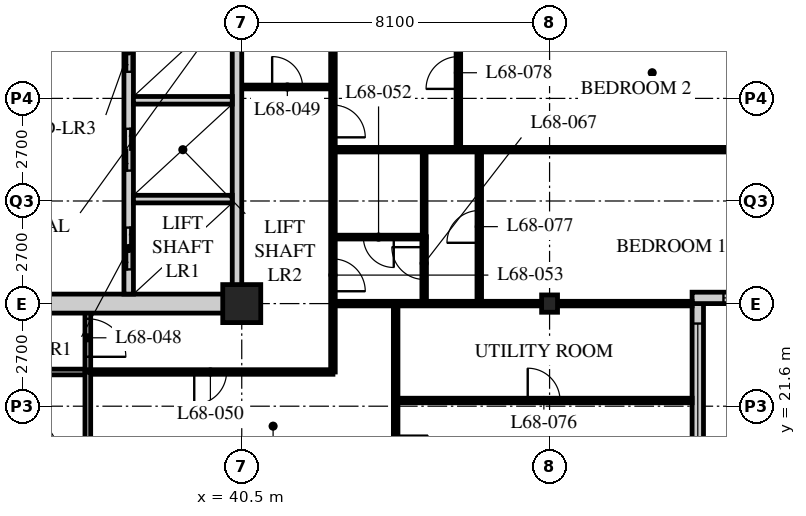
"""IFC4 building model, lengths in metres.
Left out: names, types, materials, properties, quantities, classifications, styles, units other than length and angle.
Written with IfcOpenShell. Run it as: python <this file> out.ifc"""

import sys

from ifc_helpers import new_model, si_unit, direction, frame, frame_2d, origin, origin_2d, place, context, subcontext, project, spatial, rectangle, hollow_rectangle, i_section, extrude, element, fill, save


model = new_model("IFC4")
c1 = context("Model", 3, precision=1e-05, world=origin(), true_north=direction((0.0, 1.0)))
c2 = subcontext(c1, "Body", "Model", "MODEL_VIEW")
j1 = project(units=[si_unit("LENGTHUNIT", "METRE"), si_unit("PLANEANGLEUNIT", "RADIAN")], contexts=[c1])
p1 = place(None, origin())
s1 = spatial("IfcSite", under=j1, at=p1, CompositionType="ELEMENT")
p2 = place(p1, origin())
s2 = spatial("IfcBuilding", under=s1, at=p2, CompositionType="ELEMENT")
p3 = place(p2, frame((0.0, 0.0, 265.8)))
s3 = spatial("IfcBuildingStorey", under=s2, at=p3, CompositionType="ELEMENT", Elevation=265.8)
p4 = place(p3, frame((40.5, 24.3, 0.0), z_axis=(0.0, 0.0, 1.0), x_axis=(1.0, 0.0, 0.0)))
e1 = element("IfcColumn", 1, at=p4, inside=s3, PredefinedType="COLUMN", context=c2, shape_type="SweptSolid", body=[
    extrude(hollow_rectangle(XDim=1.0, YDim=1.0, WallThickness=0.1, at=origin_2d()), origin(), (0.0, 0.0, 1.0), 3.9),
])
p5 = place(p3, frame((48.6, 24.3, 0.0), z_axis=(0.0, 0.0, 1.0), x_axis=(1.0, 0.0, 0.0)))
e2 = element("IfcColumn", 2, at=p5, inside=s3, PredefinedType="COLUMN", context=c2, shape_type="SweptSolid", body=[
    extrude(i_section(OverallWidth=0.418, OverallDepth=0.456, WebThickness=0.042, FlangeThickness=0.067, FilletRadius=0.015, at=origin_2d()), origin(), (0.0, 0.0, 1.0), 3.9),
])
p6 = place(p3, frame((52.5, 20.55, 0.0), z_axis=(0.0, 0.0, 1.0), x_axis=(0.0, 1.0, 0.0)))
e3 = element("IfcWall", 3, at=p6, inside=s3, PredefinedType="SOLIDWALL", context=c2, shape_type="SweptSolid", body=[
    extrude(rectangle(XDim=3.75, YDim=0.3, at=frame_2d((1.875, 0.0))), origin(), (0.0, 0.0, 1.0), 3.69),
])
p7 = place(p6, frame((0.225, 0.0, 0.6)))
e4 = element("IfcOpeningElement", 4, at=p7, cuts=e3, PredefinedType="OPENING", context=c2, shape_type="SweptSolid", body=[
    extrude(rectangle(XDim=3.0, YDim=2.3, at=frame_2d((1.5, 1.15))), frame((0.0, 0.16, 0.0), z_axis=(0.0, -1.0, 0.0), x_axis=(1.0, 0.0, 0.0)), (0.0, 0.0, 1.0), 0.32),
])
p8 = place(p3, frame((52.35, 24.45, 0.0), z_axis=(0.0, 0.0, 1.0), x_axis=(1.0, 0.0, 0.0)))
e5 = element("IfcWall", 5, at=p8, inside=s3, PredefinedType="SOLIDWALL", context=c2, shape_type="SweptSolid", body=[
    extrude(rectangle(XDim=4.35, YDim=0.3, at=frame_2d((2.175, 0.0))), origin(), (0.0, 0.0, 1.0), 3.69),
])
p9 = place(p8, frame((0.825, 0.0, 0.6)))
e6 = element("IfcOpeningElement", 6, at=p9, cuts=e5, PredefinedType="OPENING", context=c2, shape_type="SweptSolid", body=[
    extrude(rectangle(XDim=3.0, YDim=2.3, at=frame_2d((1.5, 1.15))), frame((0.0, 0.16, 0.0), z_axis=(0.0, -1.0, 0.0), x_axis=(1.0, 0.0, 0.0)), (0.0, 0.0, 1.0), 0.32),
])
p10 = place(p3, frame((8.1, 22.5, 0.0), z_axis=(0.0, 0.0, 1.0), x_axis=(1.0, 0.0, 0.0)))
e7 = element("IfcWall", 7, at=p10, inside=s3, PredefinedType="PARTITIONING", context=c2, shape_type="SweptSolid", body=[
    extrude(rectangle(XDim=28.35, YDim=0.15, at=frame_2d((14.175, 0.0))), origin(), (0.0, 0.0, 1.0), 3.69),
])
p11 = place(p10, frame((4.45, 0.0, 0.0)))
e8 = element("IfcOpeningElement", 8, at=p11, cuts=e7, PredefinedType="OPENING", context=c2, shape_type="SweptSolid", body=[
    extrude(rectangle(XDim=1.0, YDim=2.1, at=frame_2d((0.5, 1.05))), frame((0.0, 0.085, 0.0), z_axis=(0.0, -1.0, 0.0), x_axis=(1.0, 0.0, 0.0)), (0.0, 0.0, 1.0), 0.17),
])
p12 = place(p10, frame((12.55, 0.0, 0.0)))
e9 = element("IfcOpeningElement", 9, at=p12, cuts=e7, PredefinedType="OPENING", context=c2, shape_type="SweptSolid", body=[
    extrude(rectangle(XDim=1.0, YDim=2.1, at=frame_2d((0.5, 1.05))), frame((0.0, 0.085, 0.0), z_axis=(0.0, -1.0, 0.0), x_axis=(1.0, 0.0, 0.0)), (0.0, 0.0, 1.0), 0.17),
])
p13 = place(p10, frame((20.65, 0.0, 0.0)))
e10 = element("IfcOpeningElement", 10, at=p13, cuts=e7, PredefinedType="OPENING", context=c2, shape_type="SweptSolid", body=[
    extrude(rectangle(XDim=1.0, YDim=2.1, at=frame_2d((0.5, 1.05))), frame((0.0, 0.085, 0.0), z_axis=(0.0, -1.0, 0.0), x_axis=(1.0, 0.0, 0.0)), (0.0, 0.0, 1.0), 0.17),
])
p14 = place(p10, frame((2.625, 0.0, 0.0)))
e11 = element("IfcOpeningElement", 11, at=p14, cuts=e7, PredefinedType="OPENING", context=c2, shape_type="SweptSolid", body=[
    extrude(rectangle(XDim=1.0, YDim=2.1, at=frame_2d((0.5, 1.05))), frame((0.0, 0.085, 0.0), z_axis=(0.0, -1.0, 0.0), x_axis=(1.0, 0.0, 0.0)), (0.0, 0.0, 1.0), 0.17),
])
p15 = place(p3, frame((36.45, 22.5, 0.0), z_axis=(0.0, 0.0, 1.0), x_axis=(0.0, 1.0, 0.0)))
e12 = element("IfcWall", 12, at=p15, inside=s3, PredefinedType="PARTITIONING", context=c2, shape_type="SweptSolid", body=[
    extrude(rectangle(XDim=1.8, YDim=0.15, at=frame_2d((0.9, 0.0))), origin(), (0.0, 0.0, 1.0), 3.69),
])
p16 = place(p15, frame((0.4, 0.0, 0.0)))
e13 = element("IfcOpeningElement", 13, at=p16, cuts=e12, PredefinedType="OPENING", context=c2, shape_type="SweptSolid", body=[
    extrude(rectangle(XDim=1.0, YDim=2.1, at=frame_2d((0.5, 1.05))), frame((0.0, 0.085, 0.0), z_axis=(0.0, -1.0, 0.0), x_axis=(1.0, 0.0, 0.0)), (0.0, 0.0, 1.0), 0.17),
])
p17 = place(p3, frame((40.5, 30.0, 0.0), z_axis=(0.0, 0.0, 1.0), x_axis=(1.0, 0.0, 0.0)))
e14 = element("IfcWall", 14, at=p17, inside=s3, PredefinedType="PARTITIONING", context=c2, shape_type="SweptSolid", body=[
    extrude(rectangle(XDim=2.4, YDim=0.1, at=frame_2d((1.2, 0.0))), origin(), (0.0, 0.0, 1.0), 3.69),
])
p18 = place(p17, frame((0.8, 0.0, 0.0)))
e15 = element("IfcOpeningElement", 15, at=p18, cuts=e14, PredefinedType="OPENING", context=c2, shape_type="SweptSolid", body=[
    extrude(rectangle(XDim=0.8, YDim=2.1, at=frame_2d((0.4, 1.05))), frame((0.0, 0.06, 0.0), z_axis=(0.0, -1.0, 0.0), x_axis=(1.0, 0.0, 0.0)), (0.0, 0.0, 1.0), 0.12),
])
p19 = place(p3, frame((42.9, 22.5, 0.0), z_axis=(0.0, 0.0, 1.0), x_axis=(0.0, 1.0, 0.0)))
e16 = element("IfcWall", 16, at=p19, inside=s3, PredefinedType="PARTITIONING", context=c2, shape_type="SweptSolid", body=[
    extrude(rectangle(XDim=9.9, YDim=0.12, at=frame_2d((4.95, 0.0))), origin(), (0.0, 0.0, 1.0), 3.69),
])
p20 = place(p19, frame((2.125, 0.0, 0.0)))
e17 = element("IfcOpeningElement", 17, at=p20, cuts=e16, PredefinedType="OPENING", context=c2, shape_type="SweptSolid", body=[
    extrude(rectangle(XDim=0.85, YDim=2.1, at=frame_2d((0.425, 1.05))), frame((0.0, 0.07, 0.0), z_axis=(0.0, -1.0, 0.0), x_axis=(1.0, 0.0, 0.0)), (0.0, 0.0, 1.0), 0.14),
])
p21 = place(p19, frame((6.175, 0.0, 0.0)))
e18 = element("IfcOpeningElement", 18, at=p21, cuts=e16, PredefinedType="OPENING", context=c2, shape_type="SweptSolid", body=[
    extrude(rectangle(XDim=0.85, YDim=2.1, at=frame_2d((0.425, 1.05))), frame((0.0, 0.07, 0.0), z_axis=(0.0, -1.0, 0.0), x_axis=(1.0, 0.0, 0.0)), (0.0, 0.0, 1.0), 0.14),
])
p22 = place(p3, frame((36.45, 22.5, 0.0), z_axis=(0.0, 0.0, 1.0), x_axis=(1.0, 0.0, 0.0)))
e19 = element("IfcWall", 19, at=p22, inside=s3, PredefinedType="PARTITIONING", context=c2, shape_type="SweptSolid", body=[
    extrude(rectangle(XDim=6.45, YDim=0.12, at=frame_2d((3.225, 0.0))), origin(), (0.0, 0.0, 1.0), 3.69),
])
p23 = place(p22, frame((2.8, 0.0, 0.0)))
e20 = element("IfcOpeningElement", 20, at=p23, cuts=e19, PredefinedType="OPENING", context=c2, shape_type="SweptSolid", body=[
    extrude(rectangle(XDim=0.85, YDim=2.1, at=frame_2d((0.425, 1.05))), frame((0.0, 0.07, 0.0), z_axis=(0.0, -1.0, 0.0), x_axis=(1.0, 0.0, 0.0)), (0.0, 0.0, 1.0), 0.14),
])
p24 = place(p3, frame((42.9, 24.3, 0.0), z_axis=(0.0, 0.0, 1.0), x_axis=(1.0, 0.0, 0.0)))
e21 = element("IfcWall", 21, at=p24, inside=s3, PredefinedType="PARTITIONING", context=c2, shape_type="SweptSolid", body=[
    extrude(rectangle(XDim=9.45, YDim=0.12, at=frame_2d((4.725, 0.0))), origin(), (0.0, 0.0, 1.0), 3.078),
])
p25 = place(p3, frame((36.45, 16.5, 0.0), z_axis=(0.0, 0.0, 1.0), x_axis=(0.0, 1.0, 0.0)))
e22 = element("IfcWall", 22, at=p25, inside=s3, PredefinedType="PARTITIONING", context=c2, shape_type="SweptSolid", body=[
    extrude(rectangle(XDim=6.0, YDim=0.15, at=frame_2d((3.0, 0.0))), origin(), (0.0, 0.0, 1.0), 3.69),
])
p26 = place(p3, frame((44.55, 16.5, 0.0), z_axis=(0.0, 0.0, 1.0), x_axis=(0.0, 1.0, 0.0)))
e23 = element("IfcWall", 23, at=p26, inside=s3, PredefinedType="PARTITIONING", context=c2, shape_type="SweptSolid", body=[
    extrude(rectangle(XDim=7.8, YDim=0.12, at=frame_2d((3.9, 0.0))), origin(), (0.0, 0.0, 1.0), 3.69),
])
p27 = place(p26, frame((3.475, 0.0, 0.0)))
e24 = element("IfcOpeningElement", 24, at=p27, cuts=e23, PredefinedType="OPENING", context=c2, shape_type="SweptSolid", body=[
    extrude(rectangle(XDim=0.85, YDim=2.1, at=frame_2d((0.425, 1.05))), frame((0.0, 0.07, 0.0), z_axis=(0.0, -1.0, 0.0), x_axis=(1.0, 0.0, 0.0)), (0.0, 0.0, 1.0), 0.14),
])
p28 = place(p3, frame((42.9, 26.05, 0.0), z_axis=(0.0, 0.0, 1.0), x_axis=(1.0, 0.0, 0.0)))
e25 = element("IfcWall", 25, at=p28, inside=s3, PredefinedType="PARTITIONING", context=c2, shape_type="SweptSolid", body=[
    extrude(rectangle(XDim=2.4, YDim=0.1, at=frame_2d((1.2, 0.0))), origin(), (0.0, 0.0, 1.0), 3.69),
])
p29 = place(p28, frame((0.8, 0.0, 0.0)))
e26 = element("IfcOpeningElement", 26, at=p29, cuts=e25, PredefinedType="OPENING", context=c2, shape_type="SweptSolid", body=[
    extrude(rectangle(XDim=0.8, YDim=2.1, at=frame_2d((0.4, 1.05))), frame((0.0, 0.06, 0.0), z_axis=(0.0, -1.0, 0.0), x_axis=(1.0, 0.0, 0.0)), (0.0, 0.0, 1.0), 0.12),
])
p30 = place(p3, frame((45.3, 26.05, 0.0), z_axis=(0.0, 0.0, 1.0), x_axis=(0.0, 1.0, 0.0)))
e27 = element("IfcWall", 27, at=p30, inside=s3, PredefinedType="PARTITIONING", context=c2, shape_type="SweptSolid", body=[
    extrude(rectangle(XDim=2.3, YDim=0.1, at=frame_2d((1.15, 0.0))), origin(), (0.0, 0.0, 1.0), 3.69),
])
p31 = place(p3, frame((42.9, 28.35, 0.0), z_axis=(0.0, 0.0, 1.0), x_axis=(1.0, 0.0, 0.0)))
e28 = element("IfcWall", 28, at=p31, inside=s3, PredefinedType="PARTITIONING", context=c2, shape_type="SweptSolid", body=[
    extrude(rectangle(XDim=13.5, YDim=0.12, at=frame_2d((6.75, 0.0))), origin(), (0.0, 0.0, 1.0), 3.69),
])
p32 = place(p3, frame((45.3, 24.3, 0.0), z_axis=(0.0, 0.0, 1.0), x_axis=(0.0, 1.0, 0.0)))
e29 = element("IfcWall", 29, at=p32, inside=s3, PredefinedType="PARTITIONING", context=c2, shape_type="SweptSolid", body=[
    extrude(rectangle(XDim=1.76, YDim=0.12, at=frame_2d((0.88, 0.0))), origin(), (0.0, 0.0, 1.0), 3.69),
])
p33 = place(p32, frame((0.635, 0.0, 0.0)))
e30 = element("IfcOpeningElement", 30, at=p33, cuts=e29, PredefinedType="OPENING", context=c2, shape_type="SweptSolid", body=[
    extrude(rectangle(XDim=0.85, YDim=2.1, at=frame_2d((0.425, 1.05))), frame((0.0, 0.07, 0.0), z_axis=(0.0, -1.0, 0.0), x_axis=(1.0, 0.0, 0.0)), (0.0, 0.0, 1.0), 0.14),
])
p34 = place(p3, frame((44.55, 21.75, 0.0), z_axis=(0.0, 0.0, 1.0), x_axis=(1.0, 0.0, 0.0)))
e31 = element("IfcWall", 31, at=p34, inside=s3, PredefinedType="PARTITIONING", context=c2, shape_type="SweptSolid", body=[
    extrude(rectangle(XDim=7.8, YDim=0.12, at=frame_2d((3.9, 0.0))), origin(), (0.0, 0.0, 1.0), 3.69),
])
p35 = place(p34, frame((3.475, 0.0, 0.0)))
e32 = element("IfcOpeningElement", 32, at=p35, cuts=e31, PredefinedType="OPENING", context=c2, shape_type="SweptSolid", body=[
    extrude(rectangle(XDim=0.85, YDim=2.1, at=frame_2d((0.425, 1.05))), frame((0.0, 0.07, 0.0), z_axis=(0.0, -1.0, 0.0), x_axis=(1.0, 0.0, 0.0)), (0.0, 0.0, 1.0), 0.14),
])
p36 = place(p3, frame((46.75, 24.3, 0.0), z_axis=(0.0, 0.0, 1.0), x_axis=(0.0, 1.0, 0.0)))
e33 = element("IfcWall", 33, at=p36, inside=s3, PredefinedType="PARTITIONING", context=c2, shape_type="SweptSolid", body=[
    extrude(rectangle(XDim=4.05, YDim=0.12, at=frame_2d((2.025, 0.0))), origin(), (0.0, 0.0, 1.0), 3.69),
])
p37 = place(p36, frame((1.6, 0.0, 0.0)))
e34 = element("IfcOpeningElement", 34, at=p37, cuts=e33, PredefinedType="OPENING", context=c2, shape_type="SweptSolid", body=[
    extrude(rectangle(XDim=0.85, YDim=2.1, at=frame_2d((0.425, 1.05))), frame((0.0, 0.07, 0.0), z_axis=(0.0, -1.0, 0.0), x_axis=(1.0, 0.0, 0.0)), (0.0, 0.0, 1.0), 0.14),
])
p38 = place(p3, frame((46.2, 28.35, 0.0), z_axis=(0.0, 0.0, 1.0), x_axis=(0.0, 1.0, 0.0)))
e35 = element("IfcWall", 35, at=p38, inside=s3, PredefinedType="PARTITIONING", context=c2, shape_type="SweptSolid", body=[
    extrude(rectangle(XDim=12.15, YDim=0.12, at=frame_2d((6.075, 0.0))), origin(), (0.0, 0.0, 1.0), 3.69),
])
p39 = place(p38, frame((1.6, 0.0, 0.0)))
e36 = element("IfcOpeningElement", 36, at=p39, cuts=e35, PredefinedType="OPENING", context=c2, shape_type="SweptSolid", body=[
    extrude(rectangle(XDim=0.85, YDim=2.1, at=frame_2d((0.425, 1.05))), frame((0.0, 0.07, 0.0), z_axis=(0.0, -1.0, 0.0), x_axis=(1.0, 0.0, 0.0)), (0.0, 0.0, 1.0), 0.14),
])
p40 = place(p38, frame((9.7, 0.0, 0.0)))
e37 = element("IfcOpeningElement", 37, at=p40, cuts=e35, PredefinedType="OPENING", context=c2, shape_type="SweptSolid", body=[
    extrude(rectangle(XDim=0.85, YDim=2.1, at=frame_2d((0.425, 1.05))), frame((0.0, 0.07, 0.0), z_axis=(0.0, -1.0, 0.0), x_axis=(1.0, 0.0, 0.0)), (0.0, 0.0, 1.0), 0.14),
])
p41 = place(p38, frame((5.65, 0.0, 0.0)))
e38 = element("IfcOpeningElement", 38, at=p41, cuts=e35, PredefinedType="OPENING", context=c2, shape_type="SweptSolid", body=[
    extrude(rectangle(XDim=0.85, YDim=2.1, at=frame_2d((0.425, 1.05))), frame((0.0, 0.07, 0.0), z_axis=(0.0, -1.0, 0.0), x_axis=(1.0, 0.0, 0.0)), (0.0, 0.0, 1.0), 0.14),
])
p42 = place(p3, frame((15.95, 24.3, 0.0), z_axis=(0.0, 0.0, 1.0), x_axis=(1.0, 0.0, 0.0)))
e39 = element("IfcWall", 39, at=p42, inside=s3, PredefinedType="SOLIDWALL", context=c2, shape_type="SweptSolid", body=[
    extrude(rectangle(XDim=24.55, YDim=0.5, at=frame_2d((12.275, 0.0))), origin(), (0.0, 0.0, 1.0), 3.04),
])
p43 = place(p42, frame((11.5, 0.0, 0.0)))
e40 = element("IfcOpeningElement", 40, at=p43, cuts=e39, PredefinedType="OPENING", context=c2, shape_type="SweptSolid", body=[
    extrude(rectangle(XDim=1.8, YDim=2.4, at=frame_2d((0.9, 1.2))), frame((0.0, 0.26, 0.0), z_axis=(0.0, -1.0, 0.0), x_axis=(1.0, 0.0, 0.0)), (0.0, 0.0, 1.0), 0.52),
])
p44 = place(p3, frame((40.375, 24.55, 0.0), z_axis=(0.0, 0.0, 1.0), x_axis=(0.0, 1.0, 0.0)))
e41 = element("IfcWall", 41, at=p44, inside=s3, PredefinedType="SOLIDWALL", context=c2, shape_type="SweptSolid", body=[
    extrude(rectangle(XDim=15.7, YDim=0.25, at=frame_2d((7.85, 0.0))), origin(), (0.0, 0.0, 1.0), 3.078),
])
p45 = place(p3, frame((37.525, 24.55, 0.0), z_axis=(0.0, 0.0, 1.0), x_axis=(0.0, 1.0, 0.0)))
e42 = element("IfcWall", 42, at=p45, inside=s3, PredefinedType="SOLIDWALL", context=c2, shape_type="SweptSolid", body=[
    extrude(rectangle(XDim=7.75, YDim=0.25, at=frame_2d((3.875, 0.0))), origin(), (0.0, 0.0, 1.0), 3.69),
])
p46 = place(p45, frame((0.65, 0.0, 0.0)))
e43 = element("IfcOpeningElement", 43, at=p46, cuts=e42, PredefinedType="OPENING", context=c2, shape_type="SweptSolid", body=[
    extrude(rectangle(XDim=1.1, YDim=2.4, at=frame_2d((0.55, 1.2))), frame((0.0, 0.135, 0.0), z_axis=(0.0, -1.0, 0.0), x_axis=(1.0, 0.0, 0.0)), (0.0, 0.0, 1.0), 0.27),
])
p47 = place(p45, frame((3.25, 0.0, 0.0)))
e44 = element("IfcOpeningElement", 44, at=p47, cuts=e42, PredefinedType="OPENING", context=c2, shape_type="SweptSolid", body=[
    extrude(rectangle(XDim=1.1, YDim=2.4, at=frame_2d((0.55, 1.2))), frame((0.0, 0.135, 0.0), z_axis=(0.0, -1.0, 0.0), x_axis=(1.0, 0.0, 0.0)), (0.0, 0.0, 1.0), 0.27),
])
p48 = place(p45, frame((5.85, 0.0, 0.0)))
e45 = element("IfcOpeningElement", 45, at=p48, cuts=e42, PredefinedType="OPENING", context=c2, shape_type="SweptSolid", body=[
    extrude(rectangle(XDim=1.1, YDim=2.4, at=frame_2d((0.55, 1.2))), frame((0.0, 0.135, 0.0), z_axis=(0.0, -1.0, 0.0), x_axis=(1.0, 0.0, 0.0)), (0.0, 0.0, 1.0), 0.27),
])
for number, where, z_axis, x_axis in (
    (46, (37.65, 27.05, 0.0), (0.0, 0.0, 1.0), (1.0, 0.0, 0.0)),
    (47, (37.65, 29.65, 0.0), (0.0, 0.0, 1.0), (1.0, 0.0, 0.0)),
):
    element("IfcWall", number, at=place(p3, frame(where, z_axis=z_axis, x_axis=x_axis)), inside=s3, PredefinedType="SOLIDWALL", context=c2, shape_type="SweptSolid", body=[
        extrude(rectangle(XDim=2.6, YDim=0.2, at=frame_2d((1.3, 0.0))), origin(), (0.0, 0.0, 1.0), 3.69),
    ])
p49 = place(p7, origin())
e48 = element("IfcWindow", 48, at=p49, inside=s3, PartitioningType="SINGLE_PANEL", PredefinedType="WINDOW", context=c2, shape_type="SweptSolid", body=[
    extrude(rectangle(XDim=3.0, YDim=2.3, at=frame_2d((1.5, 1.15))), frame((0.0, 0.03, 0.0), z_axis=(0.0, -1.0, 0.0), x_axis=(1.0, 0.0, 0.0)), (0.0, 0.0, 1.0), 0.06),
])
fill(e4, e48)
p50 = place(p9, origin())
e49 = element("IfcWindow", 49, at=p50, inside=s3, PartitioningType="SINGLE_PANEL", PredefinedType="WINDOW", context=c2, shape_type="SweptSolid", body=[
    extrude(rectangle(XDim=3.0, YDim=2.3, at=frame_2d((1.5, 1.15))), frame((0.0, 0.03, 0.0), z_axis=(0.0, -1.0, 0.0), x_axis=(1.0, 0.0, 0.0)), (0.0, 0.0, 1.0), 0.06),
])
fill(e6, e49)
p51 = place(p16, origin())
e50 = element("IfcDoor", 50, at=p51, inside=s3, OperationType="SINGLE_SWING_RIGHT", PredefinedType="DOOR", context=c2, shape_type="SweptSolid", body=[
    extrude(rectangle(XDim=1.0, YDim=2.1, at=frame_2d((0.5, 1.05))), frame((0.0, 0.025, 0.0), z_axis=(0.0, -1.0, 0.0), x_axis=(1.0, 0.0, 0.0)), (0.0, 0.0, 1.0), 0.05),
])
fill(e13, e50)
p52 = place(p18, origin())
e51 = element("IfcDoor", 51, at=p52, inside=s3, OperationType="SINGLE_SWING_LEFT", PredefinedType="DOOR", context=c2, shape_type="SweptSolid", body=[
    extrude(rectangle(XDim=0.8, YDim=2.1, at=frame_2d((0.4, 1.05))), frame((0.0, 0.025, 0.0), z_axis=(0.0, -1.0, 0.0), x_axis=(1.0, 0.0, 0.0)), (0.0, 0.0, 1.0), 0.05),
])
fill(e15, e51)
p53 = place(p23, origin())
e52 = element("IfcDoor", 52, at=p53, inside=s3, OperationType="SINGLE_SWING_RIGHT", PredefinedType="DOOR", context=c2, shape_type="SweptSolid", body=[
    extrude(rectangle(XDim=0.85, YDim=2.1, at=frame_2d((0.425, 1.05))), frame((0.0, 0.025, 0.0), z_axis=(0.0, -1.0, 0.0), x_axis=(1.0, 0.0, 0.0)), (0.0, 0.0, 1.0), 0.05),
])
fill(e20, e52)
p54 = place(p27, origin())
e53 = element("IfcDoor", 53, at=p54, inside=s3, OperationType="SINGLE_SWING_LEFT", PredefinedType="DOOR", context=c2, shape_type="SweptSolid", body=[
    extrude(rectangle(XDim=0.85, YDim=2.1, at=frame_2d((0.425, 1.05))), frame((0.0, 0.025, 0.0), z_axis=(0.0, -1.0, 0.0), x_axis=(1.0, 0.0, 0.0)), (0.0, 0.0, 1.0), 0.05),
])
fill(e24, e53)
p55 = place(p29, origin())
e54 = element("IfcDoor", 54, at=p55, inside=s3, OperationType="SINGLE_SWING_LEFT", PredefinedType="DOOR", context=c2, shape_type="SweptSolid", body=[
    extrude(rectangle(XDim=0.8, YDim=2.1, at=frame_2d((0.4, 1.05))), frame((0.0, 0.025, 0.0), z_axis=(0.0, -1.0, 0.0), x_axis=(1.0, 0.0, 0.0)), (0.0, 0.0, 1.0), 0.05),
])
fill(e26, e54)
p56 = place(p20, origin())
e55 = element("IfcDoor", 55, at=p56, inside=s3, OperationType="SINGLE_SWING_RIGHT", PredefinedType="DOOR", context=c2, shape_type="SweptSolid", body=[
    extrude(rectangle(XDim=0.85, YDim=2.1, at=frame_2d((0.425, 1.05))), frame((0.0, 0.025, 0.0), z_axis=(0.0, -1.0, 0.0), x_axis=(1.0, 0.0, 0.0)), (0.0, 0.0, 1.0), 0.05),
])
fill(e17, e55)
p57 = place(p21, origin())
e56 = element("IfcDoor", 56, at=p57, inside=s3, OperationType="SINGLE_SWING_RIGHT", PredefinedType="DOOR", context=c2, shape_type="SweptSolid", body=[
    extrude(rectangle(XDim=0.85, YDim=2.1, at=frame_2d((0.425, 1.05))), frame((0.0, 0.025, 0.0), z_axis=(0.0, -1.0, 0.0), x_axis=(1.0, 0.0, 0.0)), (0.0, 0.0, 1.0), 0.05),
])
fill(e18, e56)
p58 = place(p33, origin())
e57 = element("IfcDoor", 57, at=p58, inside=s3, OperationType="SINGLE_SWING_RIGHT", PredefinedType="DOOR", context=c2, shape_type="SweptSolid", body=[
    extrude(rectangle(XDim=0.85, YDim=2.1, at=frame_2d((0.425, 1.05))), frame((0.0, 0.025, 0.0), z_axis=(0.0, -1.0, 0.0), x_axis=(1.0, 0.0, 0.0)), (0.0, 0.0, 1.0), 0.05),
])
fill(e30, e57)
p59 = place(p35, origin())
e58 = element("IfcDoor", 58, at=p59, inside=s3, OperationType="SINGLE_SWING_LEFT", PredefinedType="DOOR", context=c2, shape_type="SweptSolid", body=[
    extrude(rectangle(XDim=0.85, YDim=2.1, at=frame_2d((0.425, 1.05))), frame((0.0, 0.025, 0.0), z_axis=(0.0, -1.0, 0.0), x_axis=(1.0, 0.0, 0.0)), (0.0, 0.0, 1.0), 0.05),
])
fill(e32, e58)
p60 = place(p37, origin())
e59 = element("IfcDoor", 59, at=p60, inside=s3, OperationType="SINGLE_SWING_LEFT", PredefinedType="DOOR", context=c2, shape_type="SweptSolid", body=[
    extrude(rectangle(XDim=0.85, YDim=2.1, at=frame_2d((0.425, 1.05))), frame((0.0, 0.025, 0.0), z_axis=(0.0, -1.0, 0.0), x_axis=(1.0, 0.0, 0.0)), (0.0, 0.0, 1.0), 0.05),
])
fill(e34, e59)
p61 = place(p39, origin())
e60 = element("IfcDoor", 60, at=p61, inside=s3, OperationType="SINGLE_SWING_LEFT", PredefinedType="DOOR", context=c2, shape_type="SweptSolid", body=[
    extrude(rectangle(XDim=0.85, YDim=2.1, at=frame_2d((0.425, 1.05))), frame((0.0, 0.025, 0.0), z_axis=(0.0, -1.0, 0.0), x_axis=(1.0, 0.0, 0.0)), (0.0, 0.0, 1.0), 0.05),
])
fill(e36, e60)
p62 = place(p46, origin())
e61 = element("IfcDoor", 61, at=p62, inside=s3, OperationType="DOUBLE_DOOR_SLIDING", PredefinedType="DOOR", context=c2, shape_type="SweptSolid", body=[
    extrude(rectangle(XDim=1.1, YDim=2.4, at=frame_2d((0.55, 1.2))), frame((0.0, 0.025, 0.0), z_axis=(0.0, -1.0, 0.0), x_axis=(1.0, 0.0, 0.0)), (0.0, 0.0, 1.0), 0.05),
])
fill(e43, e61)
p63 = place(p47, origin())
e62 = element("IfcDoor", 62, at=p63, inside=s3, OperationType="DOUBLE_DOOR_SLIDING", PredefinedType="DOOR", context=c2, shape_type="SweptSolid", body=[
    extrude(rectangle(XDim=1.1, YDim=2.4, at=frame_2d((0.55, 1.2))), frame((0.0, 0.025, 0.0), z_axis=(0.0, -1.0, 0.0), x_axis=(1.0, 0.0, 0.0)), (0.0, 0.0, 1.0), 0.05),
])
fill(e44, e62)
p64 = place(p48, origin())
e63 = element("IfcDoor", 63, at=p64, inside=s3, OperationType="DOUBLE_DOOR_SLIDING", PredefinedType="DOOR", context=c2, shape_type="SweptSolid", body=[
    extrude(rectangle(XDim=1.1, YDim=2.4, at=frame_2d((0.55, 1.2))), frame((0.0, 0.025, 0.0), z_axis=(0.0, -1.0, 0.0), x_axis=(1.0, 0.0, 0.0)), (0.0, 0.0, 1.0), 0.05),
])
fill(e45, e63)
save(model, sys.argv[1])
